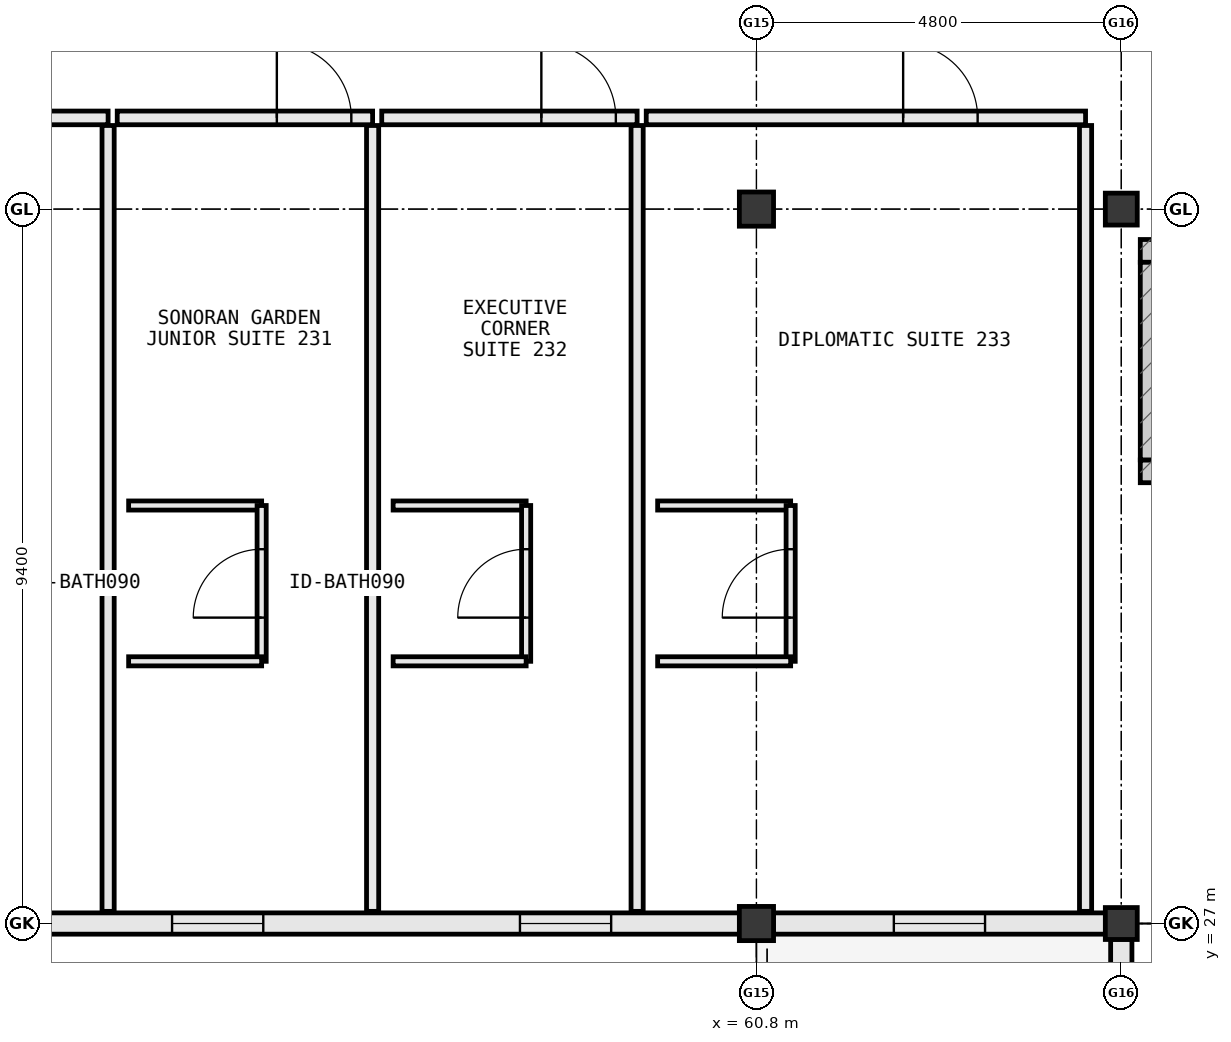
"""IFC4 building model, lengths in metres.
Left out: names, types, materials, properties, quantities, classifications, styles, units other than length and angle.
Written with IfcOpenShell. Run it as: python <this file> out.ifc"""

import sys

from ifc_helpers import new_model, si_unit, direction, frame, frame_2d, origin, origin_2d, place, context, subcontext, project, spatial, rectangle, extrude, element, fill, save


model = new_model("IFC4")
c1 = context("Model", 3, precision=1e-05, world=origin(), true_north=direction((0.0, 1.0)))
c2 = subcontext(c1, "Body", "Model", "MODEL_VIEW")
j1 = project(units=[si_unit("LENGTHUNIT", "METRE"), si_unit("PLANEANGLEUNIT", "RADIAN")], contexts=[c1])
p1 = place(None, origin())
s1 = spatial("IfcSite", under=j1, at=p1, CompositionType="ELEMENT")
p2 = place(p1, origin())
s2 = spatial("IfcBuilding", under=s1, at=p2, CompositionType="ELEMENT")
p3 = place(p2, frame((0.0, 0.0, 31.4)))
s3 = spatial("IfcBuildingStorey", under=s2, at=p3, CompositionType="ELEMENT", Elevation=31.4)
for number, where, z_axis, x_axis in (
    (1, (60.8, 27.0, 0.0), (0.0, 0.0, 1.0), (1.0, 0.0, 0.0)),
    (2, (60.8, 36.4, 0.0), (0.0, 0.0, 1.0), (1.0, 0.0, 0.0)),
):
    element("IfcColumn", number, at=place(p3, frame(where, z_axis=z_axis, x_axis=x_axis)), inside=s3, PredefinedType="COLUMN", context=c2, shape_type="SweptSolid", body=[
        extrude(rectangle(XDim=0.45, YDim=0.45, at=origin_2d()), origin(), (0.0, 0.0, 1.0), 3.8),
    ])
for number, where, z_axis, x_axis in (
    (3, (65.6, 27.0, 0.0), (0.0, 0.0, 1.0), (1.0, 0.0, 0.0)),
    (4, (65.6, 36.4, 0.0), (0.0, 0.0, 1.0), (1.0, 0.0, 0.0)),
):
    element("IfcColumn", number, at=place(p3, frame(where, z_axis=z_axis, x_axis=x_axis)), inside=s3, PredefinedType="COLUMN", context=c2, shape_type="SweptSolid", body=[
        extrude(rectangle(XDim=0.42, YDim=0.42, at=origin_2d()), origin(), (0.0, 0.0, 1.0), 3.8),
    ])
p4 = place(p3, frame((51.423, 27.0, 0.0), z_axis=(0.0, 0.0, 1.0), x_axis=(1.0, 0.0, 0.0)))
e5 = element("IfcWall", 5, at=p4, inside=s3, PredefinedType="STANDARD", context=c2, shape_type="SweptSolid", body=[
    extrude(rectangle(XDim=9.154, YDim=0.28, at=frame_2d((4.577, 0.0))), origin(), (0.0, 0.0, 1.0), 2.83),
])
p5 = place(p4, frame((1.688, 0.0, 0.85)))
e6 = element("IfcOpeningElement", 6, at=p5, cuts=e5, PredefinedType="OPENING", context=c2, shape_type="SweptSolid", body=[
    extrude(rectangle(XDim=1.2, YDim=1.55, at=frame_2d((0.6, 0.775))), frame((0.0, 0.152, 0.0), z_axis=(0.0, -1.0, 0.0), x_axis=(1.0, 0.0, 0.0)), (0.0, 0.0, 1.0), 0.304),
])
p6 = place(p4, frame((6.265, 0.0, 0.85)))
e7 = element("IfcOpeningElement", 7, at=p6, cuts=e5, PredefinedType="OPENING", context=c2, shape_type="SweptSolid", body=[
    extrude(rectangle(XDim=1.2, YDim=1.55, at=frame_2d((0.6, 0.775))), frame((0.0, 0.152, 0.0), z_axis=(0.0, -1.0, 0.0), x_axis=(1.0, 0.0, 0.0)), (0.0, 0.0, 1.0), 0.304),
])
p7 = place(p3, frame((61.023, 27.0, 0.0), z_axis=(0.0, 0.0, 1.0), x_axis=(1.0, 0.0, 0.0)))
e8 = element("IfcWall", 8, at=p7, inside=s3, PredefinedType="STANDARD", context=c2, shape_type="SweptSolid", body=[
    extrude(rectangle(XDim=4.369, YDim=0.28, at=frame_2d((2.185, 0.0))), origin(), (0.0, 0.0, 1.0), 3.01),
])
p8 = place(p7, frame((1.584, 0.0, 0.85)))
e9 = element("IfcOpeningElement", 9, at=p8, cuts=e8, PredefinedType="OPENING", context=c2, shape_type="SweptSolid", body=[
    extrude(rectangle(XDim=1.2, YDim=1.55, at=frame_2d((0.6, 0.775))), frame((0.0, 0.152, 0.0), z_axis=(0.0, -1.0, 0.0), x_axis=(1.0, 0.0, 0.0)), (0.0, 0.0, 1.0), 0.304),
])
p9 = place(p3, frame((65.6, 26.792, 0.0), z_axis=(0.0, 0.0, 1.0), x_axis=(0.0, -1.0, 0.0)))
e10 = element("IfcWall", 10, at=p9, inside=s3, PredefinedType="STANDARD", context=c2, shape_type="SweptSolid", body=[
    extrude(rectangle(XDim=7.984, YDim=0.28, at=frame_2d((3.992, 0.0))), origin(), (0.0, 0.0, 1.0), 3.01),
])
p10 = place(p9, frame((3.467, 0.0, 0.85)))
e11 = element("IfcOpeningElement", 11, at=p10, cuts=e10, PredefinedType="OPENING", context=c2, shape_type="SweptSolid", body=[
    extrude(rectangle(XDim=1.05, YDim=1.45, at=frame_2d((0.525, 0.725))), frame((0.0, 0.152, 0.0), z_axis=(0.0, -1.0, 0.0), x_axis=(1.0, 0.0, 0.0)), (0.0, 0.0, 1.0), 0.304),
])
p11 = place(p3, frame((65.85, 32.95, 0.0), z_axis=(0.0, 0.0, 1.0), x_axis=(1.0, 0.0, 0.0)))
e12 = element("IfcWall", 12, at=p11, inside=s3, PredefinedType="SHEAR", context=c2, shape_type="SweptSolid", body=[
    extrude(rectangle(XDim=2.9, YDim=0.3, at=frame_2d((1.45, 0.0))), origin(), (0.0, 0.0, 1.0), 3.8),
])
p12 = place(p11, frame((0.85, 0.0, 0.0)))
e13 = element("IfcOpeningElement", 13, at=p12, cuts=e12, PredefinedType="OPENING", context=c2, shape_type="SweptSolid", body=[
    extrude(rectangle(XDim=1.2, YDim=2.2, at=frame_2d((0.6, 1.1))), frame((0.0, 0.162, 0.0), z_axis=(0.0, -1.0, 0.0), x_axis=(1.0, 0.0, 0.0)), (0.0, 0.0, 1.0), 0.324),
])
p13 = place(p3, frame((68.75, 35.85, 0.0), z_axis=(0.0, 0.0, 1.0), x_axis=(-1.0, 0.0, 0.0)))
e14 = element("IfcWall", 14, at=p13, inside=s3, PredefinedType="SHEAR", context=c2, shape_type="SweptSolid", body=[
    extrude(rectangle(XDim=2.9, YDim=0.3, at=frame_2d((1.45, 0.0))), origin(), (0.0, 0.0, 1.0), 3.8),
])
p14 = place(p3, frame((66.0, 35.7, 0.0), z_axis=(0.0, 0.0, 1.0), x_axis=(0.0, -1.0, 0.0)))
e15 = element("IfcWall", 15, at=p14, inside=s3, PredefinedType="SHEAR", context=c2, shape_type="SweptSolid", body=[
    extrude(rectangle(XDim=2.6, YDim=0.3, at=frame_2d((1.3, 0.0))), origin(), (0.0, 0.0, 1.0), 3.8),
])
p15 = place(p3, frame((52.27, 37.6, 0.0), z_axis=(0.0, 0.0, 1.0), x_axis=(-1.0, 0.0, 0.0)))
e16 = element("IfcWall", 16, at=p15, inside=s3, PredefinedType="PARTITIONING", context=c2, shape_type="SweptSolid", body=[
    extrude(rectangle(XDim=3.36, YDim=0.18, at=frame_2d((1.68, 0.0))), origin(), (0.0, 0.0, 1.0), 3.555),
])
p16 = place(p15, frame((1.832, 0.0, 0.0)))
e17 = element("IfcOpeningElement", 17, at=p16, cuts=e16, PredefinedType="OPENING", context=c2, shape_type="SweptSolid", body=[
    extrude(rectangle(XDim=0.98, YDim=2.18, at=frame_2d((0.49, 1.09))), frame((0.0, 0.102, 0.0), z_axis=(0.0, -1.0, 0.0), x_axis=(1.0, 0.0, 0.0)), (0.0, 0.0, 1.0), 0.204),
])
p17 = place(p3, frame((52.27, 27.16, 0.0), z_axis=(0.0, 0.0, 1.0), x_axis=(0.0, 1.0, 0.0)))
e18 = element("IfcWall", 18, at=p17, inside=s3, PredefinedType="PARTITIONING", context=c2, shape_type="SweptSolid", body=[
    extrude(rectangle(XDim=10.34, YDim=0.16, at=frame_2d((5.17, 0.0))), origin(), (0.0, 0.0, 1.0), 3.555),
])
p18 = place(p3, frame((55.75, 37.6, 0.0), z_axis=(0.0, 0.0, 1.0), x_axis=(-1.0, 0.0, 0.0)))
e19 = element("IfcWall", 19, at=p18, inside=s3, PredefinedType="PARTITIONING", context=c2, shape_type="SweptSolid", body=[
    extrude(rectangle(XDim=3.36, YDim=0.18, at=frame_2d((1.68, 0.0))), origin(), (0.0, 0.0, 1.0), 3.555),
])
p19 = place(p18, frame((0.28, 0.0, 0.0)))
e20 = element("IfcOpeningElement", 20, at=p19, cuts=e19, PredefinedType="OPENING", context=c2, shape_type="SweptSolid", body=[
    extrude(rectangle(XDim=0.98, YDim=2.18, at=frame_2d((0.49, 1.09))), frame((0.0, 0.102, 0.0), z_axis=(0.0, -1.0, 0.0), x_axis=(1.0, 0.0, 0.0)), (0.0, 0.0, 1.0), 0.204),
])
p20 = place(p3, frame((55.75, 27.16, 0.0), z_axis=(0.0, 0.0, 1.0), x_axis=(0.0, 1.0, 0.0)))
e21 = element("IfcWall", 21, at=p20, inside=s3, PredefinedType="PARTITIONING", context=c2, shape_type="SweptSolid", body=[
    extrude(rectangle(XDim=10.34, YDim=0.16, at=frame_2d((5.17, 0.0))), origin(), (0.0, 0.0, 1.0), 3.555),
])
p21 = place(p3, frame((52.54, 32.5, 0.0), z_axis=(0.0, 0.0, 1.0), x_axis=(1.0, 0.0, 0.0)))
e22 = element("IfcWall", 22, at=p21, inside=s3, PredefinedType="PARTITIONING", context=c2, shape_type="SweptSolid", body=[
    extrude(rectangle(XDim=1.75, YDim=0.12, at=frame_2d((0.875, 0.0))), origin(), (0.0, 0.0, 1.0), 3.555),
])
p22 = place(p3, frame((54.29, 30.45, 0.0), z_axis=(0.0, 0.0, 1.0), x_axis=(0.0, 1.0, 0.0)))
e23 = element("IfcWall", 23, at=p22, inside=s3, PredefinedType="PARTITIONING", context=c2, shape_type="SweptSolid", body=[
    extrude(rectangle(XDim=2.05, YDim=0.12, at=frame_2d((1.025, 0.0))), origin(), (0.0, 0.0, 1.0), 3.1),
])
p23 = place(p22, frame((0.575, 0.0, 0.0)))
e24 = element("IfcOpeningElement", 24, at=p23, cuts=e23, PredefinedType="OPENING", context=c2, shape_type="SweptSolid", body=[
    extrude(rectangle(XDim=0.9, YDim=2.15, at=frame_2d((0.45, 1.075))), frame((0.0, 0.072, 0.0), z_axis=(0.0, -1.0, 0.0), x_axis=(1.0, 0.0, 0.0)), (0.0, 0.0, 1.0), 0.144),
])
p24 = place(p3, frame((52.54, 30.45, 0.0), z_axis=(0.0, 0.0, 1.0), x_axis=(1.0, 0.0, 0.0)))
e25 = element("IfcWall", 25, at=p24, inside=s3, PredefinedType="PARTITIONING", context=c2, shape_type="SweptSolid", body=[
    extrude(rectangle(XDim=1.75, YDim=0.12, at=frame_2d((0.875, 0.0))), origin(), (0.0, 0.0, 1.0), 3.555),
])
p25 = place(p3, frame((59.23, 37.6, 0.0), z_axis=(0.0, 0.0, 1.0), x_axis=(-1.0, 0.0, 0.0)))
e26 = element("IfcWall", 26, at=p25, inside=s3, PredefinedType="PARTITIONING", context=c2, shape_type="SweptSolid", body=[
    extrude(rectangle(XDim=3.36, YDim=0.18, at=frame_2d((1.68, 0.0))), origin(), (0.0, 0.0, 1.0), 3.555),
])
p26 = place(p25, frame((0.28, 0.0, 0.0)))
e27 = element("IfcOpeningElement", 27, at=p26, cuts=e26, PredefinedType="OPENING", context=c2, shape_type="SweptSolid", body=[
    extrude(rectangle(XDim=0.98, YDim=2.18, at=frame_2d((0.49, 1.09))), frame((0.0, 0.102, 0.0), z_axis=(0.0, -1.0, 0.0), x_axis=(1.0, 0.0, 0.0)), (0.0, 0.0, 1.0), 0.204),
])
p27 = place(p3, frame((59.23, 27.16, 0.0), z_axis=(0.0, 0.0, 1.0), x_axis=(0.0, 1.0, 0.0)))
e28 = element("IfcWall", 28, at=p27, inside=s3, PredefinedType="PARTITIONING", context=c2, shape_type="SweptSolid", body=[
    extrude(rectangle(XDim=10.34, YDim=0.16, at=frame_2d((5.17, 0.0))), origin(), (0.0, 0.0, 1.0), 3.555),
])
p28 = place(p3, frame((56.02, 32.5, 0.0), z_axis=(0.0, 0.0, 1.0), x_axis=(1.0, 0.0, 0.0)))
e29 = element("IfcWall", 29, at=p28, inside=s3, PredefinedType="PARTITIONING", context=c2, shape_type="SweptSolid", body=[
    extrude(rectangle(XDim=1.75, YDim=0.12, at=frame_2d((0.875, 0.0))), origin(), (0.0, 0.0, 1.0), 3.555),
])
p29 = place(p3, frame((57.77, 30.45, 0.0), z_axis=(0.0, 0.0, 1.0), x_axis=(0.0, 1.0, 0.0)))
e30 = element("IfcWall", 30, at=p29, inside=s3, PredefinedType="PARTITIONING", context=c2, shape_type="SweptSolid", body=[
    extrude(rectangle(XDim=2.05, YDim=0.12, at=frame_2d((1.025, 0.0))), origin(), (0.0, 0.0, 1.0), 3.1),
])
p30 = place(p29, frame((0.575, 0.0, 0.0)))
e31 = element("IfcOpeningElement", 31, at=p30, cuts=e30, PredefinedType="OPENING", context=c2, shape_type="SweptSolid", body=[
    extrude(rectangle(XDim=0.9, YDim=2.15, at=frame_2d((0.45, 1.075))), frame((0.0, 0.072, 0.0), z_axis=(0.0, -1.0, 0.0), x_axis=(1.0, 0.0, 0.0)), (0.0, 0.0, 1.0), 0.144),
])
p31 = place(p3, frame((56.02, 30.45, 0.0), z_axis=(0.0, 0.0, 1.0), x_axis=(1.0, 0.0, 0.0)))
e32 = element("IfcWall", 32, at=p31, inside=s3, PredefinedType="PARTITIONING", context=c2, shape_type="SweptSolid", body=[
    extrude(rectangle(XDim=1.75, YDim=0.12, at=frame_2d((0.875, 0.0))), origin(), (0.0, 0.0, 1.0), 3.555),
])
p32 = place(p3, frame((65.13, 37.6, 0.0), z_axis=(0.0, 0.0, 1.0), x_axis=(-1.0, 0.0, 0.0)))
e33 = element("IfcWall", 33, at=p32, inside=s3, PredefinedType="PARTITIONING", context=c2, shape_type="SweptSolid", body=[
    extrude(rectangle(XDim=5.78, YDim=0.18, at=frame_2d((2.89, 0.0))), origin(), (0.0, 0.0, 1.0), 3.555),
])
p33 = place(p32, frame((1.42, 0.0, 0.0)))
e34 = element("IfcOpeningElement", 34, at=p33, cuts=e33, PredefinedType="OPENING", context=c2, shape_type="SweptSolid", body=[
    extrude(rectangle(XDim=0.98, YDim=2.18, at=frame_2d((0.49, 1.09))), frame((0.0, 0.102, 0.0), z_axis=(0.0, -1.0, 0.0), x_axis=(1.0, 0.0, 0.0)), (0.0, 0.0, 1.0), 0.204),
])
p34 = place(p3, frame((65.13, 27.16, 0.0), z_axis=(0.0, 0.0, 1.0), x_axis=(0.0, 1.0, 0.0)))
e35 = element("IfcWall", 35, at=p34, inside=s3, PredefinedType="PARTITIONING", context=c2, shape_type="SweptSolid", body=[
    extrude(rectangle(XDim=10.34, YDim=0.16, at=frame_2d((5.17, 0.0))), origin(), (0.0, 0.0, 1.0), 3.555),
])
p35 = place(p3, frame((59.5, 32.5, 0.0), z_axis=(0.0, 0.0, 1.0), x_axis=(1.0, 0.0, 0.0)))
e36 = element("IfcWall", 36, at=p35, inside=s3, PredefinedType="PARTITIONING", context=c2, shape_type="SweptSolid", body=[
    extrude(rectangle(XDim=1.75, YDim=0.12, at=frame_2d((0.875, 0.0))), origin(), (0.0, 0.0, 1.0), 3.555),
])
p36 = place(p3, frame((61.25, 30.45, 0.0), z_axis=(0.0, 0.0, 1.0), x_axis=(0.0, 1.0, 0.0)))
e37 = element("IfcWall", 37, at=p36, inside=s3, PredefinedType="PARTITIONING", context=c2, shape_type="SweptSolid", body=[
    extrude(rectangle(XDim=2.05, YDim=0.12, at=frame_2d((1.025, 0.0))), origin(), (0.0, 0.0, 1.0), 3.555),
])
p37 = place(p36, frame((0.575, 0.0, 0.0)))
e38 = element("IfcOpeningElement", 38, at=p37, cuts=e37, PredefinedType="OPENING", context=c2, shape_type="SweptSolid", body=[
    extrude(rectangle(XDim=0.9, YDim=2.15, at=frame_2d((0.45, 1.075))), frame((0.0, 0.072, 0.0), z_axis=(0.0, -1.0, 0.0), x_axis=(1.0, 0.0, 0.0)), (0.0, 0.0, 1.0), 0.144),
])
p38 = place(p3, frame((59.5, 30.45, 0.0), z_axis=(0.0, 0.0, 1.0), x_axis=(1.0, 0.0, 0.0)))
e39 = element("IfcWall", 39, at=p38, inside=s3, PredefinedType="PARTITIONING", context=c2, shape_type="SweptSolid", body=[
    extrude(rectangle(XDim=1.75, YDim=0.12, at=frame_2d((0.875, 0.0))), origin(), (0.0, 0.0, 1.0), 3.555),
])
p39 = place(p5, origin())
e40 = element("IfcWindow", 40, at=p39, inside=s3, PartitioningType="SINGLE_PANEL", PredefinedType="WINDOW", context=c2, shape_type="SweptSolid", body=[
    extrude(rectangle(XDim=1.2, YDim=1.55, at=frame_2d((0.6, 0.775))), frame((0.0, 0.03, 0.0), z_axis=(0.0, -1.0, 0.0), x_axis=(1.0, 0.0, 0.0)), (0.0, 0.0, 1.0), 0.06),
])
fill(e6, e40)
p40 = place(p6, origin())
e41 = element("IfcWindow", 41, at=p40, inside=s3, PartitioningType="SINGLE_PANEL", PredefinedType="WINDOW", context=c2, shape_type="SweptSolid", body=[
    extrude(rectangle(XDim=1.2, YDim=1.55, at=frame_2d((0.6, 0.775))), frame((0.0, 0.03, 0.0), z_axis=(0.0, -1.0, 0.0), x_axis=(1.0, 0.0, 0.0)), (0.0, 0.0, 1.0), 0.06),
])
fill(e7, e41)
p41 = place(p8, origin())
e42 = element("IfcWindow", 42, at=p41, inside=s3, PartitioningType="SINGLE_PANEL", PredefinedType="WINDOW", context=c2, shape_type="SweptSolid", body=[
    extrude(rectangle(XDim=1.2, YDim=1.55, at=frame_2d((0.6, 0.775))), frame((0.0, 0.03, 0.0), z_axis=(0.0, -1.0, 0.0), x_axis=(1.0, 0.0, 0.0)), (0.0, 0.0, 1.0), 0.06),
])
fill(e9, e42)
p42 = place(p19, frame((0.98, 0.0, 0.0), z_axis=(0.0, 0.0, 1.0), x_axis=(-1.0, 0.0, 0.0)))
e43 = element("IfcDoor", 43, at=p42, inside=s3, OperationType="SINGLE_SWING_RIGHT", PredefinedType="DOOR", context=c2, shape_type="SweptSolid", body=[
    extrude(rectangle(XDim=0.98, YDim=2.18, at=frame_2d((0.49, 1.09))), frame((0.0, 0.025, 0.0), z_axis=(0.0, -1.0, 0.0), x_axis=(1.0, 0.0, 0.0)), (0.0, 0.0, 1.0), 0.05),
])
fill(e20, e43)
p43 = place(p23, origin())
e44 = element("IfcDoor", 44, at=p43, inside=s3, OperationType="SINGLE_SWING_LEFT", PredefinedType="DOOR", context=c2, shape_type="SweptSolid", body=[
    extrude(rectangle(XDim=0.9, YDim=2.15, at=frame_2d((0.45, 1.075))), frame((0.0, 0.025, 0.0), z_axis=(0.0, -1.0, 0.0), x_axis=(1.0, 0.0, 0.0)), (0.0, 0.0, 1.0), 0.05),
])
fill(e24, e44)
p44 = place(p26, frame((0.98, 0.0, 0.0), z_axis=(0.0, 0.0, 1.0), x_axis=(-1.0, 0.0, 0.0)))
e45 = element("IfcDoor", 45, at=p44, inside=s3, OperationType="SINGLE_SWING_RIGHT", PredefinedType="DOOR", context=c2, shape_type="SweptSolid", body=[
    extrude(rectangle(XDim=0.98, YDim=2.18, at=frame_2d((0.49, 1.09))), frame((0.0, 0.025, 0.0), z_axis=(0.0, -1.0, 0.0), x_axis=(1.0, 0.0, 0.0)), (0.0, 0.0, 1.0), 0.05),
])
fill(e27, e45)
p45 = place(p30, origin())
e46 = element("IfcDoor", 46, at=p45, inside=s3, OperationType="SINGLE_SWING_LEFT", PredefinedType="DOOR", context=c2, shape_type="SweptSolid", body=[
    extrude(rectangle(XDim=0.9, YDim=2.15, at=frame_2d((0.45, 1.075))), frame((0.0, 0.025, 0.0), z_axis=(0.0, -1.0, 0.0), x_axis=(1.0, 0.0, 0.0)), (0.0, 0.0, 1.0), 0.05),
])
fill(e31, e46)
p46 = place(p33, frame((0.98, 0.0, 0.0), z_axis=(0.0, 0.0, 1.0), x_axis=(-1.0, 0.0, 0.0)))
e47 = element("IfcDoor", 47, at=p46, inside=s3, OperationType="SINGLE_SWING_RIGHT", PredefinedType="DOOR", context=c2, shape_type="SweptSolid", body=[
    extrude(rectangle(XDim=0.98, YDim=2.18, at=frame_2d((0.49, 1.09))), frame((0.0, 0.025, 0.0), z_axis=(0.0, -1.0, 0.0), x_axis=(1.0, 0.0, 0.0)), (0.0, 0.0, 1.0), 0.05),
])
fill(e34, e47)
p47 = place(p37, origin())
e48 = element("IfcDoor", 48, at=p47, inside=s3, OperationType="SINGLE_SWING_LEFT", PredefinedType="DOOR", context=c2, shape_type="SweptSolid", body=[
    extrude(rectangle(XDim=0.9, YDim=2.15, at=frame_2d((0.45, 1.075))), frame((0.0, 0.025, 0.0), z_axis=(0.0, -1.0, 0.0), x_axis=(1.0, 0.0, 0.0)), (0.0, 0.0, 1.0), 0.05),
])
fill(e38, e48)
save(model, sys.argv[1])
